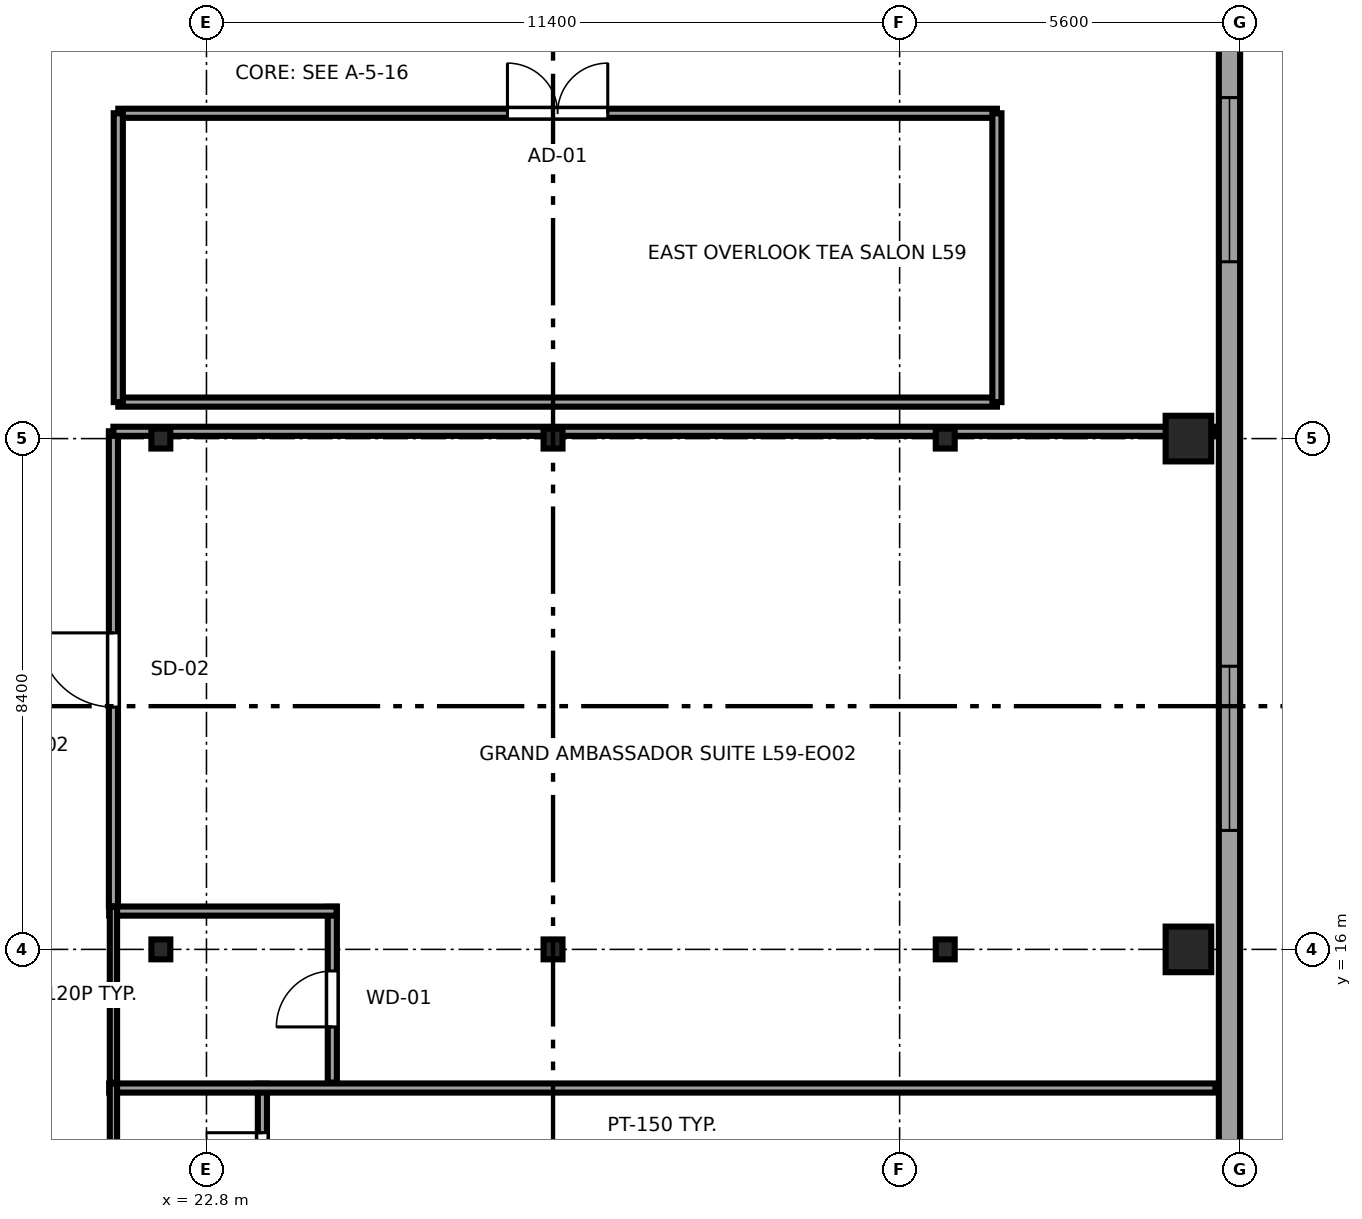
"""IFC4 building model, lengths in metres.
Left out: names, types, materials, properties, quantities, classifications, styles, units other than length and angle.
Written with IfcOpenShell. Run it as: python <this file> out.ifc"""

import sys

from ifc_helpers import new_model, si_unit, direction, frame, frame_2d, origin, origin_2d, place, context, subcontext, project, spatial, rectangle, i_section, extrude, source, transform, mapped, element, fill, save


model = new_model("IFC4")
c1 = context("Model", 3, precision=1e-05, world=origin(), true_north=direction((0.0, 1.0)))
c2 = subcontext(c1, "Body", "Model", "MODEL_VIEW")
j1 = project(units=[si_unit("LENGTHUNIT", "METRE"), si_unit("PLANEANGLEUNIT", "RADIAN")], contexts=[c1])
p1 = place(None, origin())
s1 = spatial("IfcSite", under=j1, at=p1, CompositionType="ELEMENT")
p2 = place(p1, origin())
s2 = spatial("IfcBuilding", under=s1, at=p2, CompositionType="ELEMENT")
p3 = place(p2, frame((0.0, 0.0, 223.9)))
s3 = spatial("IfcBuildingStorey", under=s2, at=p3, CompositionType="ELEMENT", Elevation=223.9)
m1 = source(origin(), c2, "Body", "SweptSolid", [
    extrude(i_section(OverallWidth=0.311, OverallDepth=0.327, WebThickness=0.016, FlangeThickness=0.025, FilletRadius=0.017, at=origin_2d()), origin(), (0.0, 0.0, 1.0), 3.55),
])
for number, where, z_axis, x_axis in (
    (1, (22.05, 16.0, 0.0), (0.0, 0.0, 1.0), (1.0, 0.0, 0.0)),
    (2, (22.05, 24.4, 0.0), (0.0, 0.0, 1.0), (1.0, 0.0, 0.0)),
    (3, (28.5, 16.0, 0.0), (0.0, 0.0, 1.0), (1.0, 0.0, 0.0)),
    (4, (28.5, 24.4, 0.0), (0.0, 0.0, 1.0), (1.0, 0.0, 0.0)),
    (5, (34.95, 16.0, 0.0), (0.0, 0.0, 1.0), (1.0, 0.0, 0.0)),
    (6, (34.95, 24.4, 0.0), (0.0, 0.0, 1.0), (1.0, 0.0, 0.0)),
):
    element("IfcColumn", number, at=place(p3, frame(where, z_axis=z_axis, x_axis=x_axis)), inside=s3, PredefinedType="COLUMN", context=c2, shape_type="MappedRepresentation", body=[
        mapped(m1, transform((0.0, 0.0, 0.0), x_axis=(1.0, 0.0, 0.0), y_axis=(0.0, 1.0, 0.0), z_axis=(0.0, 0.0, 1.0), scale=1.0)),
    ])
m2 = source(origin(), c2, "Body", "SweptSolid", [
    extrude(rectangle(XDim=0.75, YDim=0.75, at=origin_2d()), origin(), (0.0, 0.0, 1.0), 3.55),
])
for number, where, z_axis, x_axis in (
    (7, (38.95, 16.0, 0.0), (0.0, 0.0, 1.0), (1.0, 0.0, 0.0)),
    (8, (38.95, 24.4, 0.0), (0.0, 0.0, 1.0), (1.0, 0.0, 0.0)),
):
    element("IfcColumn", number, at=place(p3, frame(where, z_axis=z_axis, x_axis=x_axis)), inside=s3, PredefinedType="COLUMN", context=c2, shape_type="MappedRepresentation", body=[
        mapped(m2, transform((0.0, 0.0, 0.0), x_axis=(1.0, 0.0, 0.0), y_axis=(0.0, 1.0, 0.0), z_axis=(0.0, 0.0, 1.0), scale=1.0)),
    ])
p4 = place(p3, frame((39.625, 7.017, 0.0), z_axis=(0.0, 0.0, 1.0), x_axis=(0.0, 1.0, 0.0)))
e9 = element("IfcWall", 9, at=p4, inside=s3, PredefinedType="SOLIDWALL", context=c2, shape_type="SweptSolid", body=[
    extrude(rectangle(XDim=24.579, YDim=0.35, at=frame_2d((12.29, 0.0))), origin(), (0.0, 0.0, 1.0), 3.37),
])
p5 = place(p4, frame((2.138, 0.0, 0.68)))
e10 = element("IfcOpeningElement", 10, at=p5, cuts=e9, PredefinedType="OPENING", context=c2, shape_type="SweptSolid", body=[
    extrude(rectangle(XDim=2.7, YDim=1.95, at=frame_2d((1.35, 0.975))), frame((0.0, 0.185, 0.0), z_axis=(0.0, -1.0, 0.0), x_axis=(1.0, 0.0, 0.0)), (0.0, 0.0, 1.0), 0.37),
])
p6 = place(p4, frame((10.939, 0.0, 0.68)))
e11 = element("IfcOpeningElement", 11, at=p6, cuts=e9, PredefinedType="OPENING", context=c2, shape_type="SweptSolid", body=[
    extrude(rectangle(XDim=2.7, YDim=1.95, at=frame_2d((1.35, 0.975))), frame((0.0, 0.185, 0.0), z_axis=(0.0, -1.0, 0.0), x_axis=(1.0, 0.0, 0.0)), (0.0, 0.0, 1.0), 0.37),
])
p7 = place(p4, frame((20.291, 0.0, 0.68)))
e12 = element("IfcOpeningElement", 12, at=p7, cuts=e9, PredefinedType="OPENING", context=c2, shape_type="SweptSolid", body=[
    extrude(rectangle(XDim=2.7, YDim=1.95, at=frame_2d((1.35, 0.975))), frame((0.0, 0.185, 0.0), z_axis=(0.0, -1.0, 0.0), x_axis=(1.0, 0.0, 0.0)), (0.0, 0.0, 1.0), 0.37),
])
p8 = place(p3, frame((23.72, 11.4, 0.0), z_axis=(0.0, 0.0, 1.0), x_axis=(0.0, 1.0, 0.0)))
e13 = element("IfcWall", 13, at=p8, inside=s3, PredefinedType="PARTITIONING", context=c2, shape_type="SweptSolid", body=[
    extrude(rectangle(XDim=2.39, YDim=0.15, at=frame_2d((1.195, 0.0))), origin(), (0.0, 0.0, 1.0), 3.37),
])
p9 = place(p8, frame((0.665, 0.0, 0.0)))
e14 = element("IfcOpeningElement", 14, at=p9, cuts=e13, PredefinedType="OPENING", context=c2, shape_type="SweptSolid", body=[
    extrude(rectangle(XDim=0.92, YDim=2.01, at=frame_2d((0.46, 1.005))), frame((0.0, 0.085, 0.0), z_axis=(0.0, -1.0, 0.0), x_axis=(1.0, 0.0, 0.0)), (0.0, 0.0, 1.0), 0.17),
])
p10 = place(p3, frame((21.2, 13.72, 0.0), z_axis=(0.0, 0.0, 1.0), x_axis=(1.0, 0.0, 0.0)))
e15 = element("IfcWall", 15, at=p10, inside=s3, PredefinedType="PARTITIONING", context=c2, shape_type="SweptSolid", body=[
    extrude(rectangle(XDim=18.195, YDim=0.15, at=frame_2d((9.098, 0.0))), origin(), (0.0, 0.0, 1.0), 3.37),
])
p11 = place(p3, frame((21.27, 11.4, 0.0), z_axis=(0.0, 0.0, 1.0), x_axis=(0.0, 1.0, 0.0)))
e16 = element("IfcWall", 16, at=p11, inside=s3, PredefinedType="PLUMBINGWALL", context=c2, shape_type="SweptSolid", body=[
    extrude(rectangle(XDim=2.39, YDim=0.12, at=frame_2d((1.195, 0.0))), origin(), (0.0, 0.0, 1.0), 3.37),
])
p12 = place(p3, frame((24.87, 13.81, 0.0), z_axis=(0.0, 0.0, 1.0), x_axis=(0.0, 1.0, 0.0)))
e17 = element("IfcWall", 17, at=p12, inside=s3, PredefinedType="PARTITIONING", context=c2, shape_type="SweptSolid", body=[
    extrude(rectangle(XDim=2.89, YDim=0.15, at=frame_2d((1.445, 0.0))), origin(), (0.0, 0.0, 1.0), 3.37),
])
p13 = place(p12, frame((0.915, 0.0, 0.0)))
e18 = element("IfcOpeningElement", 18, at=p13, cuts=e17, PredefinedType="OPENING", context=c2, shape_type="SweptSolid", body=[
    extrude(rectangle(XDim=0.92, YDim=2.01, at=frame_2d((0.46, 1.005))), frame((0.0, 0.085, 0.0), z_axis=(0.0, -1.0, 0.0), x_axis=(1.0, 0.0, 0.0)), (0.0, 0.0, 1.0), 0.17),
])
p14 = place(p3, frame((21.2, 16.63, 0.0), z_axis=(0.0, 0.0, 1.0), x_axis=(1.0, 0.0, 0.0)))
e19 = element("IfcWall", 19, at=p14, inside=s3, PredefinedType="PARTITIONING", context=c2, shape_type="SweptSolid", body=[
    extrude(rectangle(XDim=3.74, YDim=0.15, at=frame_2d((1.87, 0.0))), origin(), (0.0, 0.0, 1.0), 3.37),
])
p15 = place(p3, frame((21.27, 13.81, 0.0), z_axis=(0.0, 0.0, 1.0), x_axis=(0.0, 1.0, 0.0)))
e20 = element("IfcWall", 20, at=p15, inside=s3, PredefinedType="PLUMBINGWALL", context=c2, shape_type="SweptSolid", body=[
    extrude(rectangle(XDim=2.89, YDim=0.12, at=frame_2d((1.445, 0.0))), origin(), (0.0, 0.0, 1.0), 3.37),
])
p16 = place(p3, frame((21.27, 16.71, 0.0), z_axis=(0.0, 0.0, 1.0), x_axis=(0.0, 1.0, 0.0)))
e21 = element("IfcWall", 21, at=p16, inside=s3, PredefinedType="PARTITIONING", context=c2, shape_type="SweptSolid", body=[
    extrude(rectangle(XDim=7.81, YDim=0.15, at=frame_2d((3.905, 0.0))), origin(), (0.0, 0.0, 1.0), 3.37),
])
p17 = place(p16, frame((3.275, 0.0, 0.0)))
e22 = element("IfcOpeningElement", 22, at=p17, cuts=e21, PredefinedType="OPENING", context=c2, shape_type="SweptSolid", body=[
    extrude(rectangle(XDim=1.22, YDim=2.08, at=frame_2d((0.61, 1.04))), frame((0.0, 0.085, 0.0), z_axis=(0.0, -1.0, 0.0), x_axis=(1.0, 0.0, 0.0)), (0.0, 0.0, 1.0), 0.17),
])
p18 = place(p3, frame((21.27, 24.52, 0.0), z_axis=(0.0, 0.0, 1.0), x_axis=(1.0, 0.0, 0.0)))
e23 = element("IfcWall", 23, at=p18, inside=s3, PredefinedType="PARTITIONING", context=c2, shape_type="SweptSolid", body=[
    extrude(rectangle(XDim=18.125, YDim=0.15, at=frame_2d((9.062, 0.0))), origin(), (0.0, 0.0, 1.0), 2.758),
])
p19 = place(p3, frame((21.35, 25.0, 0.0), z_axis=(0.0, 0.0, 1.0), x_axis=(1.0, 0.0, 0.0)))
e24 = element("IfcWall", 24, at=p19, inside=s3, PredefinedType="PARTITIONING", context=c2, shape_type="SweptSolid", body=[
    extrude(rectangle(XDim=14.45, YDim=0.15, at=frame_2d((7.225, 0.0))), origin(), (0.0, 0.0, 1.0), 3.37),
])
p20 = place(p3, frame((21.35, 29.75, 0.0), z_axis=(0.0, 0.0, 1.0), x_axis=(1.0, 0.0, 0.0)))
e25 = element("IfcWall", 25, at=p20, inside=s3, PredefinedType="PARTITIONING", context=c2, shape_type="SweptSolid", body=[
    extrude(rectangle(XDim=14.45, YDim=0.15, at=frame_2d((7.225, 0.0))), origin(), (0.0, 0.0, 1.0), 3.37),
])
p21 = place(p20, frame((6.4, 0.0, 0.0)))
e26 = element("IfcOpeningElement", 26, at=p21, cuts=e25, PredefinedType="OPENING", context=c2, shape_type="SweptSolid", body=[
    extrude(rectangle(XDim=1.65, YDim=2.15, at=frame_2d((0.825, 1.075))), frame((0.0, 0.085, 0.0), z_axis=(0.0, -1.0, 0.0), x_axis=(1.0, 0.0, 0.0)), (0.0, 0.0, 1.0), 0.17),
])
for number, where, z_axis, x_axis in (
    (27, (21.35, 25.0, 0.0), (0.0, 0.0, 1.0), (0.0, 1.0, 0.0)),
    (28, (35.8, 25.0, 0.0), (0.0, 0.0, 1.0), (0.0, 1.0, 0.0)),
):
    element("IfcWall", number, at=place(p3, frame(where, z_axis=z_axis, x_axis=x_axis)), inside=s3, PredefinedType="PARTITIONING", context=c2, shape_type="SweptSolid", body=[
        extrude(rectangle(XDim=4.75, YDim=0.15, at=frame_2d((2.375, 0.0))), origin(), (0.0, 0.0, 1.0), 3.37),
    ])
m3 = source(origin(), c2, "Body", "SweptSolid", [
    extrude(rectangle(XDim=2.7, YDim=1.95, at=frame_2d((1.35, 0.975))), frame((0.0, 0.09, 0.0), z_axis=(0.0, -1.0, 0.0), x_axis=(1.0, 0.0, 0.0)), (0.0, 0.0, 1.0), 0.06),
])
p22 = place(p6, origin())
e29 = element("IfcWindow", 29, at=p22, inside=s3, PartitioningType="TRIPLE_PANEL_HORIZONTAL", PredefinedType="WINDOW", context=c2, shape_type="MappedRepresentation", body=[
    mapped(m3, transform((0.0, 0.0, 0.0), x_axis=(1.0, 0.0, 0.0), y_axis=(0.0, 1.0, 0.0), z_axis=(0.0, 0.0, 1.0), scale=1.0)),
])
fill(e11, e29)
p23 = place(p7, origin())
e30 = element("IfcWindow", 30, at=p23, inside=s3, PartitioningType="TRIPLE_PANEL_HORIZONTAL", PredefinedType="WINDOW", context=c2, shape_type="MappedRepresentation", body=[
    mapped(m3, transform((0.0, 0.0, 0.0), x_axis=(1.0, 0.0, 0.0), y_axis=(0.0, 1.0, 0.0), z_axis=(0.0, 0.0, 1.0), scale=1.0)),
])
fill(e12, e30)
m4 = source(origin(), c2, "Body", "SweptSolid", [
    extrude(rectangle(XDim=0.92, YDim=2.01, at=frame_2d((0.46, 1.005))), frame((0.0, 0.025, 0.0), z_axis=(0.0, -1.0, 0.0), x_axis=(1.0, 0.0, 0.0)), (0.0, 0.0, 1.0), 0.05),
])
p24 = place(p9, origin())
e31 = element("IfcDoor", 31, at=p24, inside=s3, OperationType="SINGLE_SWING_RIGHT", PredefinedType="DOOR", context=c2, shape_type="MappedRepresentation", body=[
    mapped(m4, transform((0.0, 0.0, 0.0), x_axis=(1.0, 0.0, 0.0), y_axis=(0.0, 1.0, 0.0), z_axis=(0.0, 0.0, 1.0), scale=1.0)),
])
fill(e14, e31)
p25 = place(p13, origin())
e32 = element("IfcDoor", 32, at=p25, inside=s3, OperationType="SINGLE_SWING_LEFT", PredefinedType="DOOR", context=c2, shape_type="MappedRepresentation", body=[
    mapped(m4, transform((0.0, 0.0, 0.0), x_axis=(1.0, 0.0, 0.0), y_axis=(0.0, 1.0, 0.0), z_axis=(0.0, 0.0, 1.0), scale=1.0)),
])
fill(e18, e32)
m5 = source(origin(), c2, "Body", "SweptSolid", [
    extrude(rectangle(XDim=1.22, YDim=2.08, at=frame_2d((0.61, 1.04))), frame((0.0, 0.025, 0.0), z_axis=(0.0, -1.0, 0.0), x_axis=(1.0, 0.0, 0.0)), (0.0, 0.0, 1.0), 0.05),
])
p26 = place(p17, origin())
e33 = element("IfcDoor", 33, at=p26, inside=s3, OperationType="SINGLE_SWING_RIGHT", PredefinedType="DOOR", context=c2, shape_type="MappedRepresentation", body=[
    mapped(m5, transform((0.0, 0.0, 0.0), x_axis=(1.0, 0.0, 0.0), y_axis=(0.0, 1.0, 0.0), z_axis=(0.0, 0.0, 1.0), scale=1.0)),
])
fill(e22, e33)
m6 = source(origin(), c2, "Body", "SweptSolid", [
    extrude(rectangle(XDim=1.65, YDim=2.15, at=frame_2d((0.825, 1.075))), frame((0.0, 0.025, 0.0), z_axis=(0.0, -1.0, 0.0), x_axis=(1.0, 0.0, 0.0)), (0.0, 0.0, 1.0), 0.05),
])
p27 = place(p21, origin())
e34 = element("IfcDoor", 34, at=p27, inside=s3, OperationType="DOUBLE_DOOR_SINGLE_SWING", PredefinedType="DOOR", context=c2, shape_type="MappedRepresentation", body=[
    mapped(m6, transform((0.0, 0.0, 0.0), x_axis=(1.0, 0.0, 0.0), y_axis=(0.0, 1.0, 0.0), z_axis=(0.0, 0.0, 1.0), scale=1.0)),
])
fill(e26, e34)
save(model, sys.argv[1])
